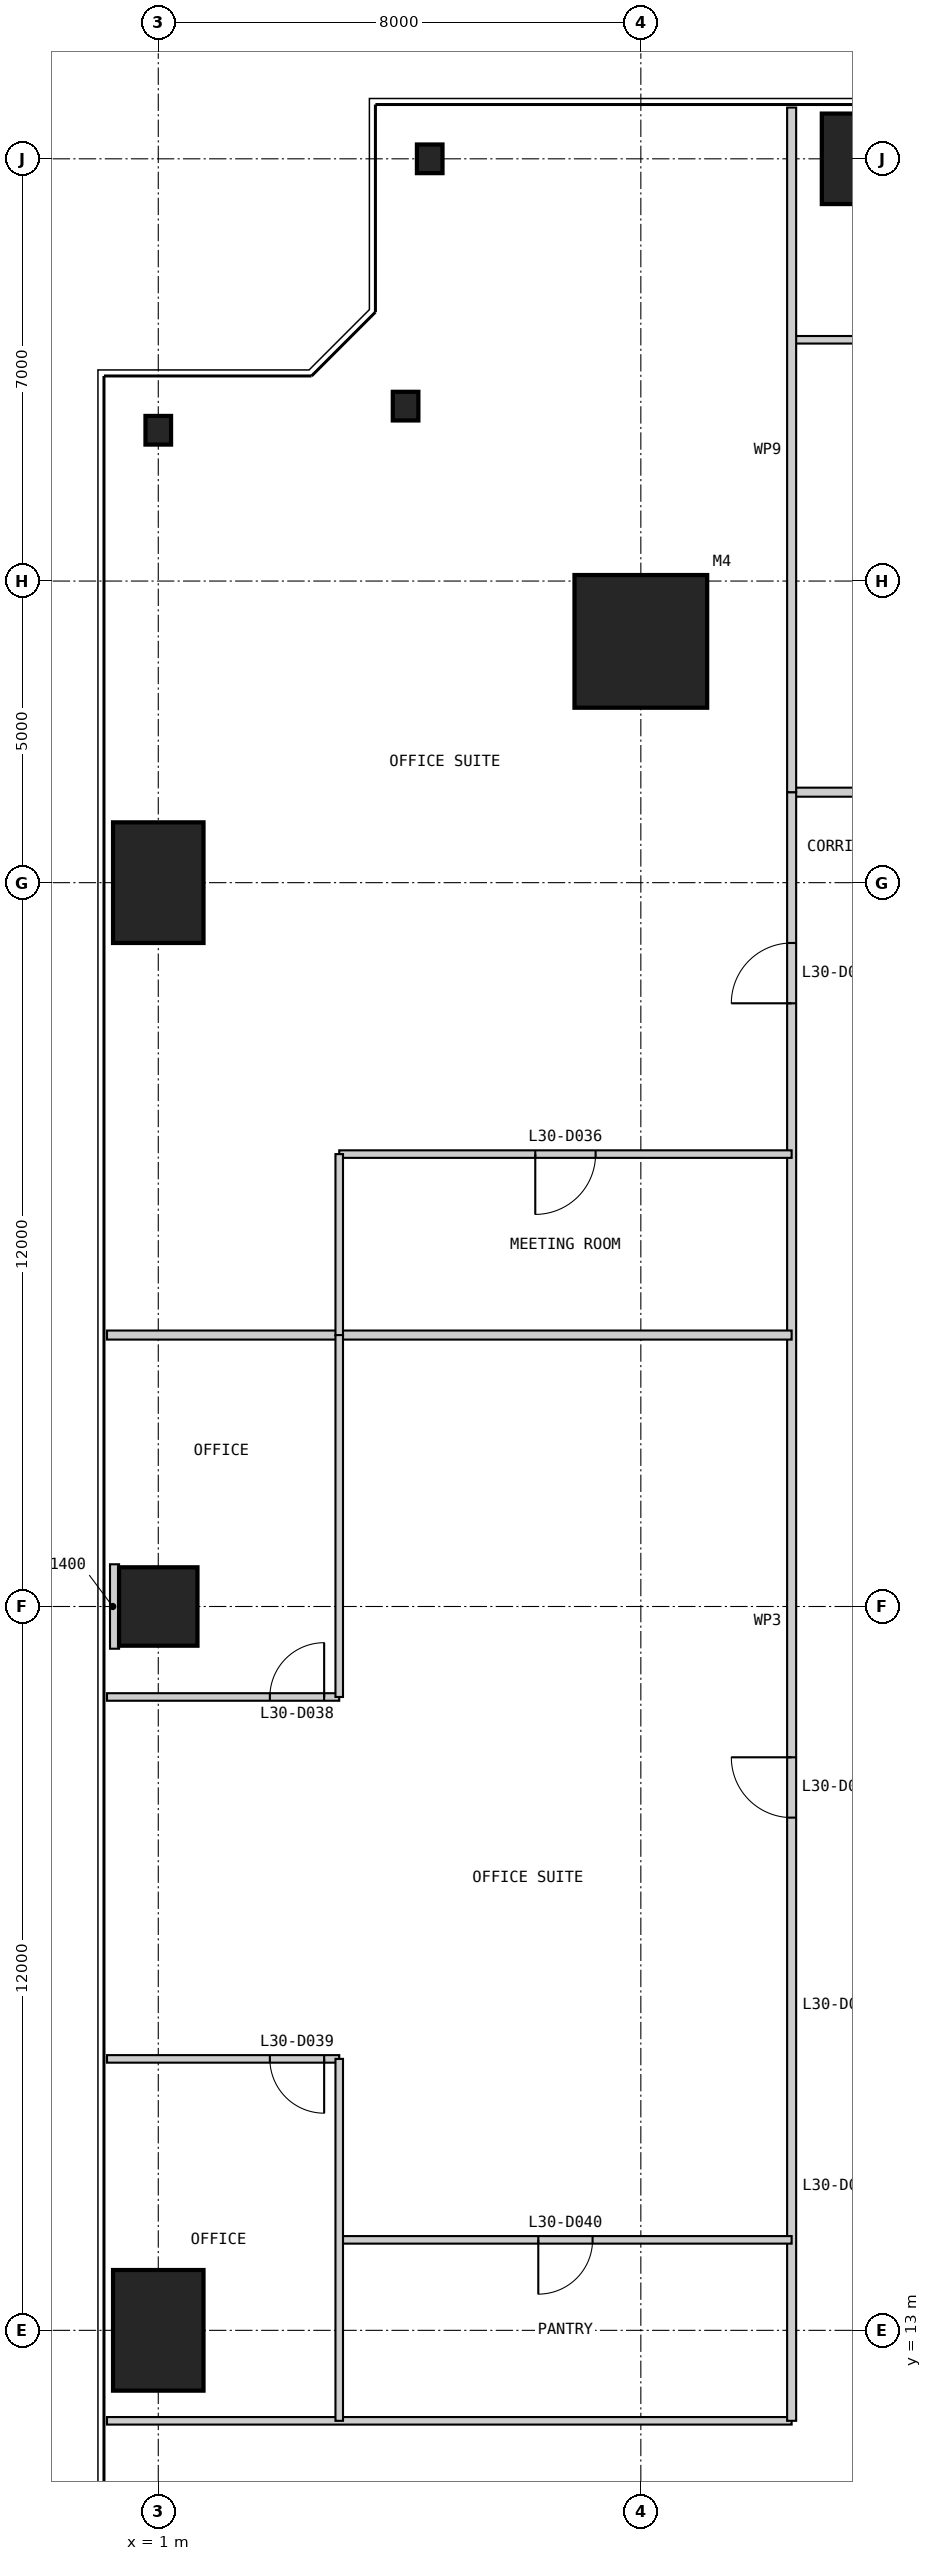
"""IFC4 building model, lengths in metres.
Left out: names, types, materials, properties, quantities, classifications, styles, units other than length and angle.
Written with IfcOpenShell. Run it as: python <this file> out.ifc"""

import sys

from ifc_helpers import new_model, si_unit, direction, frame, frame_2d, origin, origin_2d, place, context, subcontext, project, spatial, rectangle, i_section, extrude, element, fill, save


model = new_model("IFC4")
c1 = context("Model", 3, precision=1e-05, world=origin(), true_north=direction((0.0, 1.0)))
c2 = subcontext(c1, "Body", "Model", "MODEL_VIEW")
j1 = project(units=[si_unit("LENGTHUNIT", "METRE"), si_unit("PLANEANGLEUNIT", "RADIAN")], contexts=[c1])
p1 = place(None, origin())
s1 = spatial("IfcSite", under=j1, at=p1, CompositionType="ELEMENT")
p2 = place(p1, origin())
s2 = spatial("IfcBuilding", under=s1, at=p2, CompositionType="ELEMENT")
p3 = place(p2, frame((0.0, 0.0, 130.4)))
s3 = spatial("IfcBuildingStorey", under=s2, at=p3, CompositionType="ELEMENT", Elevation=130.4)
p4 = place(p3, frame((9.0, 41.0, 0.0), z_axis=(0.0, 0.0, 1.0), x_axis=(1.0, 0.0, 0.0)))
e1 = element("IfcColumn", 1, at=p4, inside=s3, PredefinedType="COLUMN", context=c2, shape_type="SweptSolid", body=[
    extrude(rectangle(XDim=2.2, YDim=2.2, at=origin_2d()), origin(), (0.0, 0.0, 1.0), 4.0),
])
p5 = place(p3, frame((13.0, 49.0, 0.0), z_axis=(0.0, 0.0, 1.0), x_axis=(1.0, 0.0, 0.0)))
e2 = element("IfcColumn", 2, at=p5, inside=s3, PredefinedType="COLUMN", context=c2, shape_type="SweptSolid", body=[
    extrude(rectangle(XDim=2.0, YDim=1.5, at=origin_2d()), origin(), (0.0, 0.0, 1.0), 4.0),
])
for number, where, z_axis, x_axis in (
    (3, (5.5, 49.0, 0.0), (0.0, 0.0, 1.0), (1.0, 0.0, 0.0)),
    (4, (5.1, 44.9, 0.0), (0.0, 0.0, 1.0), (1.0, 0.0, 0.0)),
    (5, (1.0, 44.5, 0.0), (0.0, 0.0, 1.0), (1.0, 0.0, 0.0)),
):
    element("IfcColumn", number, at=place(p3, frame(where, z_axis=z_axis, x_axis=x_axis)), inside=s3, PredefinedType="COLUMN", context=c2, shape_type="SweptSolid", body=[
        extrude(i_section(OverallWidth=0.424, OverallDepth=0.475, WebThickness=0.048, FlangeThickness=0.077, at=origin_2d()), origin(), (0.0, 0.0, 1.0), 4.0),
    ])
p6 = place(p3, frame((1.0, 37.0, 0.0), z_axis=(0.0, 0.0, 1.0), x_axis=(1.0, 0.0, 0.0)))
e6 = element("IfcColumn", 6, at=p6, inside=s3, PredefinedType="COLUMN", context=c2, shape_type="SweptSolid", body=[
    extrude(rectangle(XDim=1.5, YDim=2.0, at=origin_2d()), origin(), (0.0, 0.0, 1.0), 4.0),
])
p7 = place(p3, frame((1.0, 25.0, 0.0), z_axis=(0.0, 0.0, 1.0), x_axis=(1.0, 0.0, 0.0)))
e7 = element("IfcColumn", 7, at=p7, inside=s3, PredefinedType="COLUMN", context=c2, shape_type="SweptSolid", body=[
    extrude(rectangle(XDim=1.3, YDim=1.3, at=origin_2d()), origin(), (0.0, 0.0, 1.0), 4.0),
])
p8 = place(p3, frame((1.0, 13.0, 0.0), z_axis=(0.0, 0.0, 1.0), x_axis=(1.0, 0.0, 0.0)))
e8 = element("IfcColumn", 8, at=p8, inside=s3, PredefinedType="COLUMN", context=c2, shape_type="SweptSolid", body=[
    extrude(rectangle(XDim=1.5, YDim=2.0, at=origin_2d()), origin(), (0.0, 0.0, 1.0), 4.0),
])
p9 = place(p3, frame((0.15, 11.5, 0.0), z_axis=(0.0, 0.0, 1.0), x_axis=(1.0, 0.0, 0.0)))
e9 = element("IfcWall", 9, at=p9, inside=s3, PredefinedType="PARTITIONING", context=c2, shape_type="SweptSolid", body=[
    extrude(rectangle(XDim=11.35, YDim=0.125, at=frame_2d((5.675, 0.0))), origin(), (0.0, 0.0, 1.0), 3.85),
])
p10 = place(p3, frame((38.5, 38.5, 0.0), z_axis=(0.0, 0.0, 1.0), x_axis=(-1.0, 0.0, 0.0)))
e10 = element("IfcWall", 10, at=p10, inside=s3, PredefinedType="PARTITIONING", context=c2, shape_type="SweptSolid", body=[
    extrude(rectangle(XDim=27.0, YDim=0.15, at=frame_2d((13.5, 0.0))), origin(), (0.0, 0.0, 1.0), 3.85),
])
p11 = place(p10, frame((11.5, 0.0, 0.0)))
e11 = element("IfcOpeningElement", 11, at=p11, cuts=e10, PredefinedType="OPENING", context=c2, shape_type="SweptSolid", body=[
    extrude(rectangle(XDim=1.0, YDim=2.2, at=frame_2d((0.5, 1.1))), frame((0.0, 0.085, 0.0), z_axis=(0.0, -1.0, 0.0), x_axis=(1.0, 0.0, 0.0)), (0.0, 0.0, 1.0), 0.17),
])
p12 = place(p3, frame((35.5, 46.0, 0.0), z_axis=(0.0, 0.0, 1.0), x_axis=(-1.0, 0.0, 0.0)))
e12 = element("IfcWall", 12, at=p12, inside=s3, PredefinedType="PARTITIONING", context=c2, shape_type="SweptSolid", body=[
    extrude(rectangle(XDim=24.0, YDim=0.125, at=frame_2d((12.0, 0.0))), origin(), (0.0, 0.0, 1.0), 3.85),
])
p13 = place(p12, frame((10.05, 0.0, 0.0)))
e13 = element("IfcOpeningElement", 13, at=p13, cuts=e12, PredefinedType="OPENING", context=c2, shape_type="SweptSolid", body=[
    extrude(rectangle(XDim=0.9, YDim=2.2, at=frame_2d((0.45, 1.1))), frame((0.0, 0.073, 0.0), z_axis=(0.0, -1.0, 0.0), x_axis=(1.0, 0.0, 0.0)), (0.0, 0.0, 1.0), 0.145),
])
p14 = place(p12, frame((16.05, 0.0, 0.0)))
e14 = element("IfcOpeningElement", 14, at=p14, cuts=e12, PredefinedType="OPENING", context=c2, shape_type="SweptSolid", body=[
    extrude(rectangle(XDim=0.9, YDim=2.2, at=frame_2d((0.45, 1.1))), frame((0.0, 0.073, 0.0), z_axis=(0.0, -1.0, 0.0), x_axis=(1.0, 0.0, 0.0)), (0.0, 0.0, 1.0), 0.145),
])
p15 = place(p12, frame((19.0, 0.0, 0.0)))
e15 = element("IfcOpeningElement", 15, at=p15, cuts=e12, PredefinedType="OPENING", context=c2, shape_type="SweptSolid", body=[
    extrude(rectangle(XDim=1.0, YDim=2.2, at=frame_2d((0.5, 1.1))), frame((0.0, 0.073, 0.0), z_axis=(0.0, -1.0, 0.0), x_axis=(1.0, 0.0, 0.0)), (0.0, 0.0, 1.0), 0.145),
])
p16 = place(p3, frame((11.5, 38.5, 0.0), z_axis=(0.0, 0.0, 1.0), x_axis=(0.0, -1.0, 0.0)))
e16 = element("IfcWall", 16, at=p16, inside=s3, PredefinedType="PARTITIONING", context=c2, shape_type="SweptSolid", body=[
    extrude(rectangle(XDim=27.0, YDim=0.15, at=frame_2d((13.5, 0.0))), origin(), (0.0, 0.0, 1.0), 3.85),
])
p17 = place(p16, frame((2.5, 0.0, 0.0)))
e17 = element("IfcOpeningElement", 17, at=p17, cuts=e16, PredefinedType="OPENING", context=c2, shape_type="SweptSolid", body=[
    extrude(rectangle(XDim=1.0, YDim=2.2, at=frame_2d((0.5, 1.1))), frame((0.0, 0.085, 0.0), z_axis=(0.0, -1.0, 0.0), x_axis=(1.0, 0.0, 0.0)), (0.0, 0.0, 1.0), 0.17),
])
p18 = place(p16, frame((16.0, 0.0, 0.0)))
e18 = element("IfcOpeningElement", 18, at=p18, cuts=e16, PredefinedType="OPENING", context=c2, shape_type="SweptSolid", body=[
    extrude(rectangle(XDim=1.0, YDim=2.2, at=frame_2d((0.5, 1.1))), frame((0.0, 0.085, 0.0), z_axis=(0.0, -1.0, 0.0), x_axis=(1.0, 0.0, 0.0)), (0.0, 0.0, 1.0), 0.17),
])
p19 = place(p3, frame((11.5, 49.85, 0.0), z_axis=(0.0, 0.0, 1.0), x_axis=(0.0, -1.0, 0.0)))
e19 = element("IfcWall", 19, at=p19, inside=s3, PredefinedType="PARTITIONING", context=c2, shape_type="SweptSolid", body=[
    extrude(rectangle(XDim=11.35, YDim=0.15, at=frame_2d((5.675, 0.0))), origin(), (0.0, 0.0, 1.0), 3.85),
])
p20 = place(p3, frame((4.0, 32.5, 0.0), z_axis=(0.0, 0.0, 1.0), x_axis=(1.0, 0.0, 0.0)))
e20 = element("IfcWall", 20, at=p20, inside=s3, PredefinedType="PARTITIONING", context=c2, shape_type="SweptSolid", body=[
    extrude(rectangle(XDim=7.5, YDim=0.125, at=frame_2d((3.75, 0.0))), origin(), (0.0, 0.0, 1.0), 3.85),
])
p21 = place(p20, frame((3.25, 0.0, 0.0)))
e21 = element("IfcOpeningElement", 21, at=p21, cuts=e20, PredefinedType="OPENING", context=c2, shape_type="SweptSolid", body=[
    extrude(rectangle(XDim=1.0, YDim=2.2, at=frame_2d((0.5, 1.1))), frame((0.0, 0.073, 0.0), z_axis=(0.0, -1.0, 0.0), x_axis=(1.0, 0.0, 0.0)), (0.0, 0.0, 1.0), 0.145),
])
p22 = place(p3, frame((0.15, 29.5, 0.0), z_axis=(0.0, 0.0, 1.0), x_axis=(1.0, 0.0, 0.0)))
e22 = element("IfcWall", 22, at=p22, inside=s3, PredefinedType="PARTITIONING", context=c2, shape_type="SweptSolid", body=[
    extrude(rectangle(XDim=11.35, YDim=0.15, at=frame_2d((5.675, 0.0))), origin(), (0.0, 0.0, 1.0), 3.85),
])
p23 = place(p3, frame((0.15, 23.5, 0.0), z_axis=(0.0, 0.0, 1.0), x_axis=(1.0, 0.0, 0.0)))
e23 = element("IfcWall", 23, at=p23, inside=s3, PredefinedType="PARTITIONING", context=c2, shape_type="SweptSolid", body=[
    extrude(rectangle(XDim=3.85, YDim=0.125, at=frame_2d((1.925, 0.0))), origin(), (0.0, 0.0, 1.0), 3.85),
])
p24 = place(p23, frame((2.7, 0.0, 0.0)))
e24 = element("IfcOpeningElement", 24, at=p24, cuts=e23, PredefinedType="OPENING", context=c2, shape_type="SweptSolid", body=[
    extrude(rectangle(XDim=0.9, YDim=2.2, at=frame_2d((0.45, 1.1))), frame((0.0, 0.073, 0.0), z_axis=(0.0, -1.0, 0.0), x_axis=(1.0, 0.0, 0.0)), (0.0, 0.0, 1.0), 0.145),
])
p25 = place(p3, frame((0.15, 17.5, 0.0), z_axis=(0.0, 0.0, 1.0), x_axis=(1.0, 0.0, 0.0)))
e25 = element("IfcWall", 25, at=p25, inside=s3, PredefinedType="PARTITIONING", context=c2, shape_type="SweptSolid", body=[
    extrude(rectangle(XDim=3.85, YDim=0.125, at=frame_2d((1.925, 0.0))), origin(), (0.0, 0.0, 1.0), 3.85),
])
p26 = place(p25, frame((2.7, 0.0, 0.0)))
e26 = element("IfcOpeningElement", 26, at=p26, cuts=e25, PredefinedType="OPENING", context=c2, shape_type="SweptSolid", body=[
    extrude(rectangle(XDim=0.9, YDim=2.2, at=frame_2d((0.45, 1.1))), frame((0.0, 0.073, 0.0), z_axis=(0.0, -1.0, 0.0), x_axis=(1.0, 0.0, 0.0)), (0.0, 0.0, 1.0), 0.145),
])
p27 = place(p3, frame((4.0, 14.5, 0.0), z_axis=(0.0, 0.0, 1.0), x_axis=(1.0, 0.0, 0.0)))
e27 = element("IfcWall", 27, at=p27, inside=s3, PredefinedType="PARTITIONING", context=c2, shape_type="SweptSolid", body=[
    extrude(rectangle(XDim=7.5, YDim=0.125, at=frame_2d((3.75, 0.0))), origin(), (0.0, 0.0, 1.0), 3.85),
])
p28 = place(p27, frame((3.3, 0.0, 0.0)))
e28 = element("IfcOpeningElement", 28, at=p28, cuts=e27, PredefinedType="OPENING", context=c2, shape_type="SweptSolid", body=[
    extrude(rectangle(XDim=0.9, YDim=2.2, at=frame_2d((0.45, 1.1))), frame((0.0, 0.073, 0.0), z_axis=(0.0, -1.0, 0.0), x_axis=(1.0, 0.0, 0.0)), (0.0, 0.0, 1.0), 0.145),
])
p29 = place(p3, frame((4.0, 32.5, 0.0), z_axis=(0.0, 0.0, 1.0), x_axis=(0.0, -1.0, 0.0)))
e29 = element("IfcWall", 29, at=p29, inside=s3, PredefinedType="PARTITIONING", context=c2, shape_type="SweptSolid", body=[
    extrude(rectangle(XDim=3.0, YDim=0.125, at=frame_2d((1.5, 0.0))), origin(), (0.0, 0.0, 1.0), 3.238),
])
for number, where, z_axis, x_axis in (
    (30, (4.0, 29.5, 0.0), (0.0, 0.0, 1.0), (0.0, -1.0, 0.0)),
    (31, (4.0, 17.5, 0.0), (0.0, 0.0, 1.0), (0.0, -1.0, 0.0)),
):
    element("IfcWall", number, at=place(p3, frame(where, z_axis=z_axis, x_axis=x_axis)), inside=s3, PredefinedType="PARTITIONING", context=c2, shape_type="SweptSolid", body=[
        extrude(rectangle(XDim=6.0, YDim=0.125, at=frame_2d((3.0, 0.0))), origin(), (0.0, 0.0, 1.0), 3.238),
    ])
p30 = place(p3, frame((0.2, 25.0, 0.0), z_axis=(0.0, 0.0, 1.0), x_axis=(1.0, 0.0, 0.0)))
e32 = element("IfcWall", 32, at=p30, inside=s3, PredefinedType="PARTITIONING", context=c2, shape_type="SweptSolid", body=[
    extrude(rectangle(XDim=0.15, YDim=1.4, at=frame_2d((0.075, 0.0))), origin(), (0.0, 0.0, 1.0), 3.85),
])
p31 = place(p17, frame((1.0, 0.0, 0.0), z_axis=(0.0, 0.0, 1.0), x_axis=(-1.0, 0.0, 0.0)))
e33 = element("IfcDoor", 33, at=p31, inside=s3, OperationType="SINGLE_SWING_LEFT", PredefinedType="DOOR", context=c2, shape_type="SweptSolid", body=[
    extrude(rectangle(XDim=1.0, YDim=2.2, at=frame_2d((0.5, 1.1))), frame((0.0, 0.025, 0.0), z_axis=(0.0, -1.0, 0.0), x_axis=(1.0, 0.0, 0.0)), (0.0, 0.0, 1.0), 0.05),
])
fill(e17, e33)
p32 = place(p21, frame((1.0, 0.0, 0.0), z_axis=(0.0, 0.0, 1.0), x_axis=(-1.0, 0.0, 0.0)))
e34 = element("IfcDoor", 34, at=p32, inside=s3, OperationType="SINGLE_SWING_RIGHT", PredefinedType="DOOR", context=c2, shape_type="SweptSolid", body=[
    extrude(rectangle(XDim=1.0, YDim=2.2, at=frame_2d((0.5, 1.1))), frame((0.0, 0.025, 0.0), z_axis=(0.0, -1.0, 0.0), x_axis=(1.0, 0.0, 0.0)), (0.0, 0.0, 1.0), 0.05),
])
fill(e21, e34)
p33 = place(p18, frame((1.0, 0.0, 0.0), z_axis=(0.0, 0.0, 1.0), x_axis=(-1.0, 0.0, 0.0)))
e35 = element("IfcDoor", 35, at=p33, inside=s3, OperationType="SINGLE_SWING_RIGHT", PredefinedType="DOOR", context=c2, shape_type="SweptSolid", body=[
    extrude(rectangle(XDim=1.0, YDim=2.2, at=frame_2d((0.5, 1.1))), frame((0.0, 0.025, 0.0), z_axis=(0.0, -1.0, 0.0), x_axis=(1.0, 0.0, 0.0)), (0.0, 0.0, 1.0), 0.05),
])
fill(e18, e35)
p34 = place(p24, origin())
e36 = element("IfcDoor", 36, at=p34, inside=s3, OperationType="SINGLE_SWING_RIGHT", PredefinedType="DOOR", context=c2, shape_type="SweptSolid", body=[
    extrude(rectangle(XDim=0.9, YDim=2.2, at=frame_2d((0.45, 1.1))), frame((0.0, 0.025, 0.0), z_axis=(0.0, -1.0, 0.0), x_axis=(1.0, 0.0, 0.0)), (0.0, 0.0, 1.0), 0.05),
])
fill(e24, e36)
p35 = place(p26, frame((0.9, 0.0, 0.0), z_axis=(0.0, 0.0, 1.0), x_axis=(-1.0, 0.0, 0.0)))
e37 = element("IfcDoor", 37, at=p35, inside=s3, OperationType="SINGLE_SWING_LEFT", PredefinedType="DOOR", context=c2, shape_type="SweptSolid", body=[
    extrude(rectangle(XDim=0.9, YDim=2.2, at=frame_2d((0.45, 1.1))), frame((0.0, 0.025, 0.0), z_axis=(0.0, -1.0, 0.0), x_axis=(1.0, 0.0, 0.0)), (0.0, 0.0, 1.0), 0.05),
])
fill(e26, e37)
p36 = place(p28, frame((0.9, 0.0, 0.0), z_axis=(0.0, 0.0, 1.0), x_axis=(-1.0, 0.0, 0.0)))
e38 = element("IfcDoor", 38, at=p36, inside=s3, OperationType="SINGLE_SWING_RIGHT", PredefinedType="DOOR", context=c2, shape_type="SweptSolid", body=[
    extrude(rectangle(XDim=0.9, YDim=2.2, at=frame_2d((0.45, 1.1))), frame((0.0, 0.025, 0.0), z_axis=(0.0, -1.0, 0.0), x_axis=(1.0, 0.0, 0.0)), (0.0, 0.0, 1.0), 0.05),
])
fill(e28, e38)
save(model, sys.argv[1])
